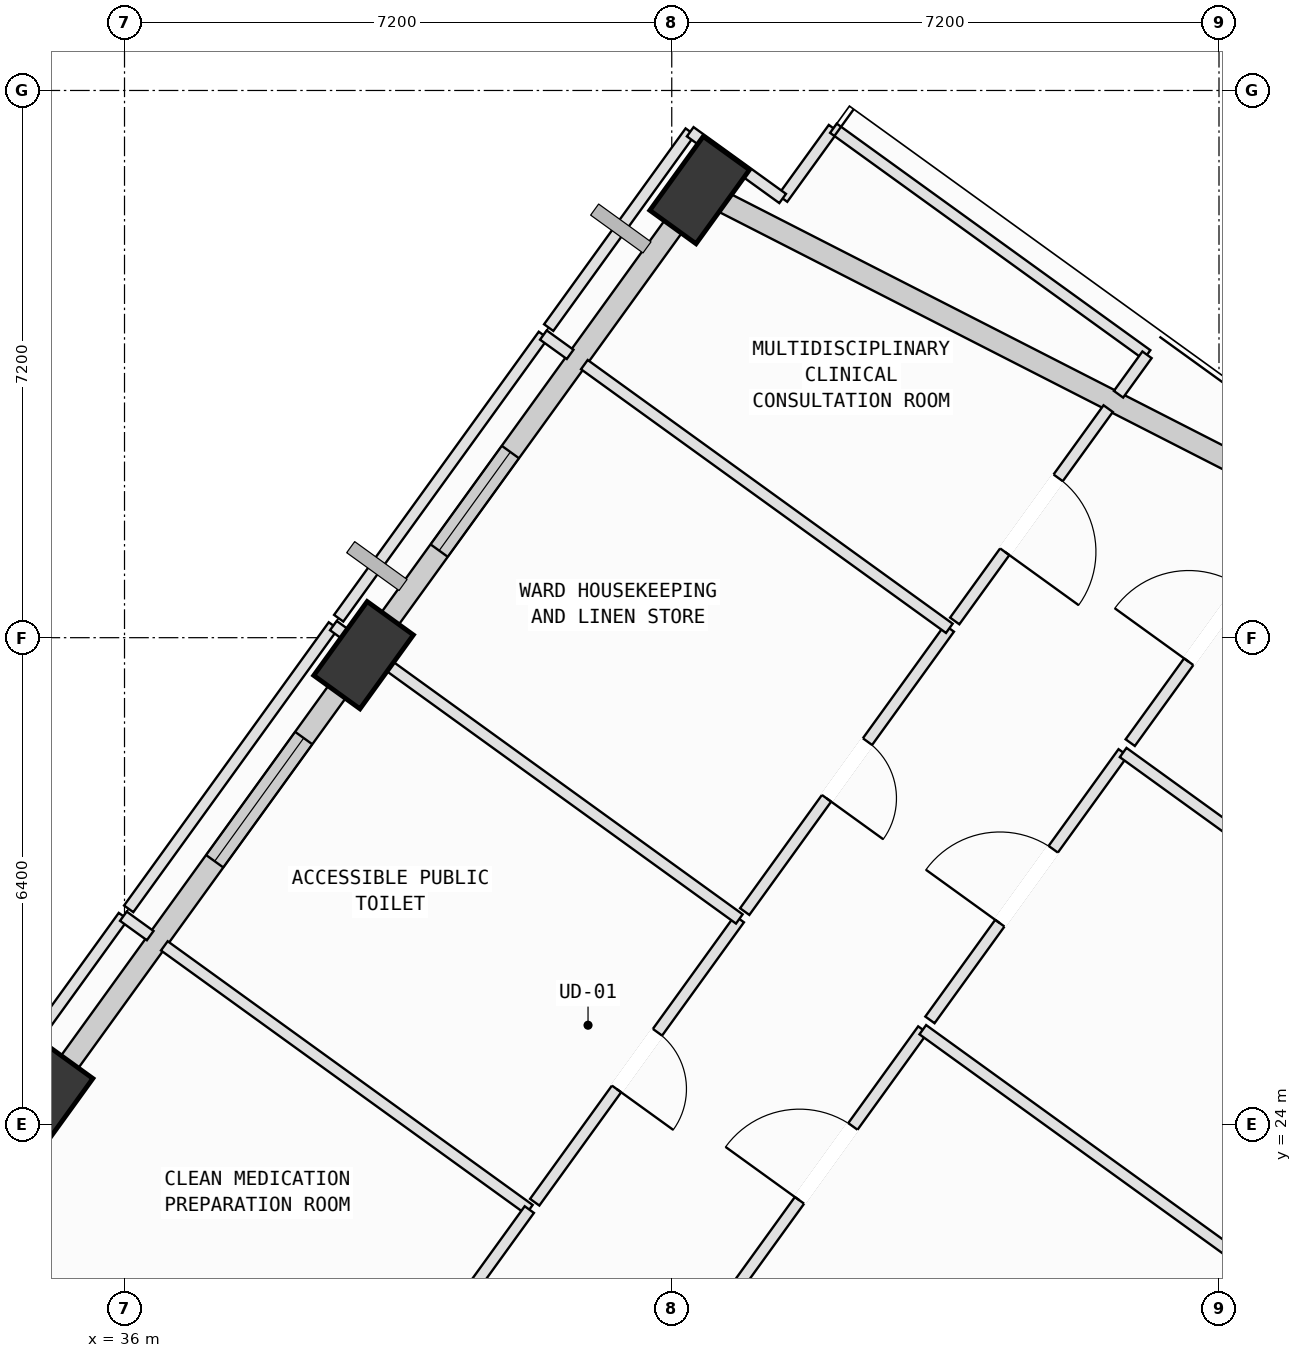
"""IFC4 building model, lengths in metres.
Left out: names, types, materials, properties, quantities, classifications, styles, units other than length and angle.
Written with IfcOpenShell. Run it as: python <this file> out.ifc"""

import sys

from ifc_helpers import new_model, si_unit, direction, frame, frame_2d, origin, origin_2d, place, context, subcontext, project, spatial, rectangle, extrude, element, fill, save


model = new_model("IFC4")
c1 = context("Model", 3, precision=1e-05, world=origin(), true_north=direction((0.0, 1.0)))
c2 = subcontext(c1, "Body", "Model", "MODEL_VIEW")
j1 = project(units=[si_unit("LENGTHUNIT", "METRE"), si_unit("PLANEANGLEUNIT", "RADIAN")], contexts=[c1])
p1 = place(None, origin())
s1 = spatial("IfcSite", under=j1, at=p1, CompositionType="ELEMENT")
p2 = place(p1, origin())
s2 = spatial("IfcBuilding", under=s1, at=p2, CompositionType="ELEMENT")
p3 = place(p2, frame((0.0, 0.0, 255.2)))
s3 = spatial("IfcBuildingStorey", under=s2, at=p3, CompositionType="ELEMENT", Elevation=255.2)
p4 = place(p3, frame((43.567, 36.289, 0.002), z_axis=(-0.047861468634, 0.040849915904, 0.998018318565), x_axis=(0.235093031796, -0.970633778523, 0.051003278244)))
e1 = element("IfcColumn", 1, at=p4, inside=s3, PredefinedType="COLUMN", context=c2, shape_type="SweptSolid", body=[
    extrude(rectangle(XDim=1.2, YDim=0.75, at=origin_2d()), origin(), (0.0, 0.0, 1.0), 4.004),
])
p5 = place(p3, frame((39.145, 30.17, 0.002), z_axis=(-0.022408981669, 0.022775341042, 0.99948943035), x_axis=(0.150719539021, -0.988237272701, 0.025898135105)))
e2 = element("IfcColumn", 2, at=p5, inside=s3, PredefinedType="COLUMN", context=c2, shape_type="SweptSolid", body=[
    extrude(rectangle(XDim=1.2, YDim=0.75, at=origin_2d()), origin(), (0.0, 0.0, 1.0), 3.998),
])
p6 = place(p3, frame((34.928, 24.333, 0.002), z_axis=(0.001893791031, 0.005559193026, 0.999982754316), x_axis=(-0.815748535883, -0.578387124425, 0.004760305024)))
e3 = element("IfcColumn", 3, at=p6, inside=s3, PredefinedType="COLUMN", context=c2, shape_type="SweptSolid", body=[
    extrude(rectangle(XDim=1.2, YDim=0.75, at=origin_2d()), origin(), (0.0, 0.0, 1.0), 3.996),
])
p7 = place(p3, frame((43.811, 36.165, 0.0), z_axis=(0.0, 0.0, 1.0), x_axis=(0.890535873605, -0.454913022261, 0.0)))
e4 = element("IfcWall", 4, at=p7, inside=s3, PredefinedType="SOLIDWALL", context=c2, shape_type="SweptSolid", body=[
    extrude(rectangle(XDim=9.037, YDim=0.28, at=frame_2d((4.518, 0.0))), origin(), (0.0, 0.0, 1.0), 3.265),
])
p8 = place(p3, frame((39.381, 30.496, 0.0), z_axis=(0.0, 0.0, 1.0), x_axis=(0.585668033743, 0.810551018908, 0.0)))
e5 = element("IfcWall", 5, at=p8, inside=s3, PredefinedType="SOLIDWALL", context=c2, shape_type="SweptSolid", body=[
    extrude(rectangle(XDim=6.78, YDim=0.28, at=frame_2d((3.39, 0.0))), origin(), (0.0, 0.0, 1.0), 3.265),
])
p9 = place(p8, frame((1.295, 0.0, 0.75)))
e6 = element("IfcOpeningElement", 6, at=p9, cuts=e5, PredefinedType="OPENING", context=c2, shape_type="SweptSolid", body=[
    extrude(rectangle(XDim=1.6, YDim=1.95, at=frame_2d((0.8, 0.975))), frame((0.0, 0.15, 0.0), z_axis=(0.0, -1.0, 0.0), x_axis=(1.0, 0.0, 0.0)), (0.0, 0.0, 1.0), 0.3),
])
p10 = place(p3, frame((35.168, 24.665, 0.0), z_axis=(0.0, 0.0, 1.0), x_axis=(0.585643524066, 0.810568727943, 0.0)))
e7 = element("IfcWall", 7, at=p10, inside=s3, PredefinedType="SOLIDWALL", context=c2, shape_type="SweptSolid", body=[
    extrude(rectangle(XDim=6.409, YDim=0.28, at=frame_2d((3.205, 0.0))), origin(), (0.0, 0.0, 1.0), 3.265),
])
p11 = place(p10, frame((3.447, 0.0, 0.75)))
e8 = element("IfcOpeningElement", 8, at=p11, cuts=e7, PredefinedType="OPENING", context=c2, shape_type="SweptSolid", body=[
    extrude(rectangle(XDim=2.0, YDim=1.95, at=frame_2d((1.0, 0.975))), frame((0.0, 0.15, 0.0), z_axis=(0.0, -1.0, 0.0), x_axis=(1.0, 0.0, 0.0)), (0.0, 0.0, 1.0), 0.3),
])
p12 = place(p3, frame((43.961, 21.724, 0.0), z_axis=(0.0, 0.0, 1.0), x_axis=(0.585693863478, 0.810532354865, 0.0)))
e9 = element("IfcWall", 9, at=p12, inside=s3, PredefinedType="PARTITIONING", context=c2, shape_type="SweptSolid", body=[
    extrude(rectangle(XDim=4.34, YDim=0.15, at=frame_2d((2.17, 0.0))), origin(), (0.0, 0.0, 1.0), 3.78),
])
p13 = place(p12, frame((1.57, 0.0, 0.0)))
e10 = element("IfcOpeningElement", 10, at=p13, cuts=e9, PredefinedType="OPENING", context=c2, shape_type="SweptSolid", body=[
    extrude(rectangle(XDim=1.2, YDim=2.15, at=frame_2d((0.6, 1.075))), frame((0.0, 0.085, 0.0), z_axis=(0.0, -1.0, 0.0), x_axis=(1.0, 0.0, 0.0)), (0.0, 0.0, 1.0), 0.17),
])
p14 = place(p3, frame((46.503, 25.242, 0.0), z_axis=(0.0, 0.0, 1.0), x_axis=(0.810553530126, -0.585664558259, 0.0)))
e11 = element("IfcWall", 11, at=p14, inside=s3, PredefinedType="PARTITIONING", context=c2, shape_type="SweptSolid", body=[
    extrude(rectangle(XDim=11.935, YDim=0.15, at=frame_2d((5.968, 0.0))), origin(), (0.0, 0.0, 1.0), 3.78),
])
p15 = place(p3, frame((46.597, 25.371, 0.0), z_axis=(0.0, 0.0, 1.0), x_axis=(0.585693863478, 0.810532354865, 0.0)))
e12 = element("IfcWall", 12, at=p15, inside=s3, PredefinedType="PARTITIONING", context=c2, shape_type="SweptSolid", body=[
    extrude(rectangle(XDim=4.34, YDim=0.15, at=frame_2d((2.17, 0.0))), origin(), (0.0, 0.0, 1.0), 3.78),
])
p16 = place(p15, frame((1.57, 0.0, 0.0)))
e13 = element("IfcOpeningElement", 13, at=p16, cuts=e12, PredefinedType="OPENING", context=c2, shape_type="SweptSolid", body=[
    extrude(rectangle(XDim=1.2, YDim=2.15, at=frame_2d((0.6, 1.075))), frame((0.0, 0.085, 0.0), z_axis=(0.0, -1.0, 0.0), x_axis=(1.0, 0.0, 0.0)), (0.0, 0.0, 1.0), 0.17),
])
p17 = place(p3, frame((49.139, 28.889, 0.0), z_axis=(0.0, 0.0, 1.0), x_axis=(0.810544932865, -0.585676456593, 0.0)))
e14 = element("IfcWall", 14, at=p17, inside=s3, PredefinedType="PARTITIONING", context=c2, shape_type="SweptSolid", body=[
    extrude(rectangle(XDim=11.363, YDim=0.15, at=frame_2d((5.682, 0.0))), origin(), (0.0, 0.0, 1.0), 3.78),
])
p18 = place(p3, frame((49.232, 29.019, 0.0), z_axis=(0.0, 0.0, 1.0), x_axis=(0.58580257886, 0.810453785605, 0.0)))
e15 = element("IfcWall", 15, at=p18, inside=s3, PredefinedType="PARTITIONING", context=c2, shape_type="SweptSolid", body=[
    extrude(rectangle(XDim=3.828, YDim=0.15, at=frame_2d((1.914, 0.0))), origin(), (0.0, 0.0, 1.0), 3.78),
])
p19 = place(p18, frame((1.314, 0.0, 0.0)))
e16 = element("IfcOpeningElement", 16, at=p19, cuts=e15, PredefinedType="OPENING", context=c2, shape_type="SweptSolid", body=[
    extrude(rectangle(XDim=1.2, YDim=2.15, at=frame_2d((0.6, 1.075))), frame((0.0, 0.085, 0.0), z_axis=(0.0, -1.0, 0.0), x_axis=(1.0, 0.0, 0.0)), (0.0, 0.0, 1.0), 0.17),
])
p20 = place(p3, frame((33.292, 23.008, 0.0), z_axis=(0.0, 0.0, 1.0), x_axis=(0.585684390919, 0.81053919969, 0.0)))
e17 = element("IfcWall", 17, at=p20, inside=s3, PredefinedType="PARTITIONING", context=c2, shape_type="SweptSolid", body=[
    extrude(rectangle(XDim=4.598, YDim=0.15, at=frame_2d((2.299, 0.0))), origin(), (0.0, 0.0, 1.0), 3.78),
])
p21 = place(p3, frame((35.985, 26.735, 0.0), z_axis=(0.0, 0.0, 1.0), x_axis=(0.810309392331, -0.586002294108, 0.0)))
e18 = element("IfcWall", 18, at=p21, inside=s3, PredefinedType="PARTITIONING", context=c2, shape_type="SweptSolid", body=[
    extrude(rectangle(XDim=0.435, YDim=0.15, at=frame_2d((0.218, 0.0))), origin(), (0.0, 0.0, 1.0), 3.78),
])
p22 = place(p3, frame((36.524, 26.345, 0.0), z_axis=(0.0, 0.0, 1.0), x_axis=(0.81053033329, -0.585696661094, 0.0)))
e19 = element("IfcWall", 19, at=p22, inside=s3, PredefinedType="PARTITIONING", context=c2, shape_type="SweptSolid", body=[
    extrude(rectangle(XDim=5.925, YDim=0.15, at=frame_2d((2.962, 0.0))), origin(), (0.0, 0.0, 1.0), 3.78),
])
p23 = place(p3, frame((41.326, 22.875, 0.0), z_axis=(0.0, 0.0, 1.0), x_axis=(-0.585638666842, -0.810572237311, 0.0)))
e20 = element("IfcWall", 20, at=p23, inside=s3, PredefinedType="PARTITIONING", context=c2, shape_type="SweptSolid", body=[
    extrude(rectangle(XDim=2.708, YDim=0.15, at=frame_2d((1.354, 0.0))), origin(), (0.0, 0.0, 1.0), 3.78),
])
p24 = place(p3, frame((36.515, 20.68, 0.0), z_axis=(0.0, 0.0, 1.0), x_axis=(-0.810587832846, 0.58561708073, 0.0)))
e21 = element("IfcWall", 21, at=p24, inside=s3, PredefinedType="PARTITIONING", context=c2, shape_type="SweptSolid", body=[
    extrude(rectangle(XDim=3.311, YDim=0.15, at=frame_2d((1.656, 0.0))), origin(), (0.0, 0.0, 1.0), 3.78),
])
p25 = place(p3, frame((44.089, 26.699, 0.0), z_axis=(0.0, 0.0, 1.0), x_axis=(-0.585544838351, -0.810640020157, 0.0)))
e22 = element("IfcWall", 22, at=p25, inside=s3, PredefinedType="PARTITIONING", context=c2, shape_type="SweptSolid", body=[
    extrude(rectangle(XDim=4.598, YDim=0.15, at=frame_2d((2.299, 0.0))), origin(), (0.0, 0.0, 1.0), 3.78),
])
p26 = place(p25, frame((1.839, 0.0, 0.0)))
e23 = element("IfcOpeningElement", 23, at=p26, cuts=e22, PredefinedType="OPENING", context=c2, shape_type="SweptSolid", body=[
    extrude(rectangle(XDim=0.92, YDim=2.1, at=frame_2d((0.46, 1.05))), frame((0.0, 0.085, 0.0), z_axis=(0.0, -1.0, 0.0), x_axis=(1.0, 0.0, 0.0)), (0.0, 0.0, 1.0), 0.17),
])
p27 = place(p3, frame((36.055, 26.832, 0.0), z_axis=(0.0, 0.0, 1.0), x_axis=(0.585684390919, 0.81053919969, 0.0)))
e24 = element("IfcWall", 24, at=p27, inside=s3, PredefinedType="PARTITIONING", context=c2, shape_type="SweptSolid", body=[
    extrude(rectangle(XDim=4.598, YDim=0.15, at=frame_2d((2.299, 0.0))), origin(), (0.0, 0.0, 1.0), 3.265),
])
p28 = place(p3, frame((38.748, 30.559, 0.0), z_axis=(0.0, 0.0, 1.0), x_axis=(0.810486733326, -0.585756993217, 0.0)))
e25 = element("IfcWall", 25, at=p28, inside=s3, PredefinedType="PARTITIONING", context=c2, shape_type="SweptSolid", body=[
    extrude(rectangle(XDim=6.59, YDim=0.15, at=frame_2d((3.295, 0.0))), origin(), (0.0, 0.0, 1.0), 3.78),
])
p29 = place(p3, frame((46.852, 30.523, 0.0), z_axis=(0.0, 0.0, 1.0), x_axis=(-0.585544838351, -0.810640020157, 0.0)))
e26 = element("IfcWall", 26, at=p29, inside=s3, PredefinedType="PARTITIONING", context=c2, shape_type="SweptSolid", body=[
    extrude(rectangle(XDim=4.598, YDim=0.15, at=frame_2d((2.299, 0.0))), origin(), (0.0, 0.0, 1.0), 3.78),
])
p30 = place(p29, frame((1.839, 0.0, 0.0)))
e27 = element("IfcOpeningElement", 27, at=p30, cuts=e26, PredefinedType="OPENING", context=c2, shape_type="SweptSolid", body=[
    extrude(rectangle(XDim=0.92, YDim=2.1, at=frame_2d((0.46, 1.05))), frame((0.0, 0.085, 0.0), z_axis=(0.0, -1.0, 0.0), x_axis=(1.0, 0.0, 0.0)), (0.0, 0.0, 1.0), 0.17),
])
p31 = place(p3, frame((38.818, 30.656, 0.0), z_axis=(0.0, 0.0, 1.0), x_axis=(0.58575034069, 0.810491541215, 0.0)))
e28 = element("IfcWall", 28, at=p31, inside=s3, PredefinedType="PARTITIONING", context=c2, shape_type="SweptSolid", body=[
    extrude(rectangle(XDim=4.597, YDim=0.15, at=frame_2d((2.299, 0.0))), origin(), (0.0, 0.0, 1.0), 3.265),
])
p32 = place(p3, frame((41.511, 34.382, 0.0), z_axis=(0.0, 0.0, 1.0), x_axis=(0.810797825158, -0.585326307899, 0.0)))
e29 = element("IfcWall", 29, at=p32, inside=s3, PredefinedType="PARTITIONING", context=c2, shape_type="SweptSolid", body=[
    extrude(rectangle(XDim=0.434, YDim=0.15, at=frame_2d((0.217, 0.0))), origin(), (0.0, 0.0, 1.0), 3.78),
])
p33 = place(p3, frame((42.05, 33.993, 0.0), z_axis=(0.0, 0.0, 1.0), x_axis=(0.81053033329, -0.585696661094, 0.0)))
e30 = element("IfcWall", 30, at=p33, inside=s3, PredefinedType="PARTITIONING", context=c2, shape_type="SweptSolid", body=[
    extrude(rectangle(XDim=5.925, YDim=0.15, at=frame_2d((2.962, 0.0))), origin(), (0.0, 0.0, 1.0), 3.78),
])
p34 = place(p3, frame((44.659, 36.179, 0.0), z_axis=(0.0, 0.0, 1.0), x_axis=(0.585826664319, 0.810436375894, 0.0)))
e31 = element("IfcWall", 31, at=p34, inside=s3, PredefinedType="PARTITIONING", context=c2, shape_type="SweptSolid", body=[
    extrude(rectangle(XDim=1.14, YDim=0.15, at=frame_2d((0.57, 0.0))), origin(), (0.0, 0.0, 1.0), 3.78),
])
p35 = place(p3, frame((45.327, 37.103, 0.0), z_axis=(0.0, 0.0, 1.0), x_axis=(0.810578036325, -0.585630640445, 0.0)))
e32 = element("IfcWall", 32, at=p35, inside=s3, PredefinedType="PARTITIONING", context=c2, shape_type="SweptSolid", body=[
    extrude(rectangle(XDim=5.09, YDim=0.15, at=frame_2d((2.545, 0.0))), origin(), (0.0, 0.0, 1.0), 3.78),
])
p36 = place(p3, frame((49.453, 34.122, 0.0), z_axis=(0.0, 0.0, 1.0), x_axis=(-0.585629751067, -0.810578678886, 0.0)))
e33 = element("IfcWall", 33, at=p36, inside=s3, PredefinedType="PARTITIONING", context=c2, shape_type="SweptSolid", body=[
    extrude(rectangle(XDim=0.64, YDim=0.15, at=frame_2d((0.32, 0.0))), origin(), (0.0, 0.0, 1.0), 3.78),
])
p37 = place(p3, frame((48.942, 33.414, 0.0), z_axis=(0.0, 0.0, 1.0), x_axis=(-0.585671558501, -0.810548472063, 0.0)))
e34 = element("IfcWall", 34, at=p37, inside=s3, PredefinedType="PARTITIONING", context=c2, shape_type="SweptSolid", body=[
    extrude(rectangle(XDim=3.447, YDim=0.15, at=frame_2d((1.724, 0.0))), origin(), (0.0, 0.0, 1.0), 3.78),
])
p38 = place(p37, frame((1.124, 0.0, 0.0)))
e35 = element("IfcOpeningElement", 35, at=p38, cuts=e34, PredefinedType="OPENING", context=c2, shape_type="SweptSolid", body=[
    extrude(rectangle(XDim=1.2, YDim=2.15, at=frame_2d((0.6, 1.075))), frame((0.0, 0.085, 0.0), z_axis=(0.0, -1.0, 0.0), x_axis=(1.0, 0.0, 0.0)), (0.0, 0.0, 1.0), 0.17),
])
p39 = place(p3, frame((41.581, 34.48, 0.0), z_axis=(0.0, 0.0, 1.0), x_axis=(0.585689602473, 0.810535433867, 0.0)))
e36 = element("IfcWall", 36, at=p39, inside=s3, PredefinedType="PARTITIONING", context=c2, shape_type="SweptSolid", body=[
    extrude(rectangle(XDim=3.179, YDim=0.15, at=frame_2d((1.59, 0.0))), origin(), (0.0, 0.0, 1.0), 3.265),
])
p40 = place(p3, frame((43.443, 37.057, 0.0), z_axis=(0.0, 0.0, 1.0), x_axis=(0.810730739227, -0.58541922455, 0.0)))
e37 = element("IfcWall", 37, at=p40, inside=s3, PredefinedType="PARTITIONING", context=c2, shape_type="SweptSolid", body=[
    extrude(rectangle(XDim=1.5, YDim=0.15, at=frame_2d((0.75, 0.0))), origin(), (0.0, 0.0, 1.0), 3.265),
])
p41 = place(p9, origin())
e38 = element("IfcWindow", 38, at=p41, inside=s3, PartitioningType="SINGLE_PANEL", PredefinedType="WINDOW", context=c2, shape_type="SweptSolid", body=[
    extrude(rectangle(XDim=1.6, YDim=1.95, at=frame_2d((0.8, 0.975))), frame((0.0, 0.03, 0.0), z_axis=(0.0, -1.0, 0.0), x_axis=(1.0, 0.0, 0.0)), (0.0, 0.0, 1.0), 0.06),
])
fill(e6, e38)
p42 = place(p11, origin())
e39 = element("IfcWindow", 39, at=p42, inside=s3, PartitioningType="SINGLE_PANEL", PredefinedType="WINDOW", context=c2, shape_type="SweptSolid", body=[
    extrude(rectangle(XDim=2.0, YDim=1.95, at=frame_2d((1.0, 0.975))), frame((0.0, 0.03, 0.0), z_axis=(0.0, -1.0, 0.0), x_axis=(1.0, 0.0, 0.0)), (0.0, 0.0, 1.0), 0.06),
])
fill(e8, e39)
p43 = place(p13, origin())
e40 = element("IfcDoor", 40, at=p43, inside=s3, OperationType="SINGLE_SWING_LEFT", PredefinedType="DOOR", context=c2, shape_type="SweptSolid", body=[
    extrude(rectangle(XDim=1.2, YDim=2.15, at=frame_2d((0.6, 1.075))), frame((0.0, 0.025, 0.0), z_axis=(0.0, -1.0, 0.0), x_axis=(1.0, 0.0, 0.0)), (0.0, 0.0, 1.0), 0.05),
])
fill(e10, e40)
p44 = place(p16, origin())
e41 = element("IfcDoor", 41, at=p44, inside=s3, OperationType="SINGLE_SWING_LEFT", PredefinedType="DOOR", context=c2, shape_type="SweptSolid", body=[
    extrude(rectangle(XDim=1.2, YDim=2.15, at=frame_2d((0.6, 1.075))), frame((0.0, 0.025, 0.0), z_axis=(0.0, -1.0, 0.0), x_axis=(1.0, 0.0, 0.0)), (0.0, 0.0, 1.0), 0.05),
])
fill(e13, e41)
p45 = place(p19, origin())
e42 = element("IfcDoor", 42, at=p45, inside=s3, OperationType="SINGLE_SWING_LEFT", PredefinedType="DOOR", context=c2, shape_type="SweptSolid", body=[
    extrude(rectangle(XDim=1.2, YDim=2.15, at=frame_2d((0.6, 1.075))), frame((0.0, 0.025, 0.0), z_axis=(0.0, -1.0, 0.0), x_axis=(1.0, 0.0, 0.0)), (0.0, 0.0, 1.0), 0.05),
])
fill(e16, e42)
p46 = place(p26, origin())
e43 = element("IfcDoor", 43, at=p46, inside=s3, OperationType="SINGLE_SWING_RIGHT", PredefinedType="DOOR", context=c2, shape_type="SweptSolid", body=[
    extrude(rectangle(XDim=0.92, YDim=2.1, at=frame_2d((0.46, 1.05))), frame((0.0, 0.025, 0.0), z_axis=(0.0, -1.0, 0.0), x_axis=(1.0, 0.0, 0.0)), (0.0, 0.0, 1.0), 0.05),
])
fill(e23, e43)
p47 = place(p30, origin())
e44 = element("IfcDoor", 44, at=p47, inside=s3, OperationType="SINGLE_SWING_RIGHT", PredefinedType="DOOR", context=c2, shape_type="SweptSolid", body=[
    extrude(rectangle(XDim=0.92, YDim=2.1, at=frame_2d((0.46, 1.05))), frame((0.0, 0.025, 0.0), z_axis=(0.0, -1.0, 0.0), x_axis=(1.0, 0.0, 0.0)), (0.0, 0.0, 1.0), 0.05),
])
fill(e27, e44)
p48 = place(p38, origin())
e45 = element("IfcDoor", 45, at=p48, inside=s3, OperationType="SINGLE_SWING_RIGHT", PredefinedType="DOOR", context=c2, shape_type="SweptSolid", body=[
    extrude(rectangle(XDim=1.2, YDim=2.15, at=frame_2d((0.6, 1.075))), frame((0.0, 0.025, 0.0), z_axis=(0.0, -1.0, 0.0), x_axis=(1.0, 0.0, 0.0)), (0.0, 0.0, 1.0), 0.05),
])
fill(e35, e45)
save(model, sys.argv[1])
